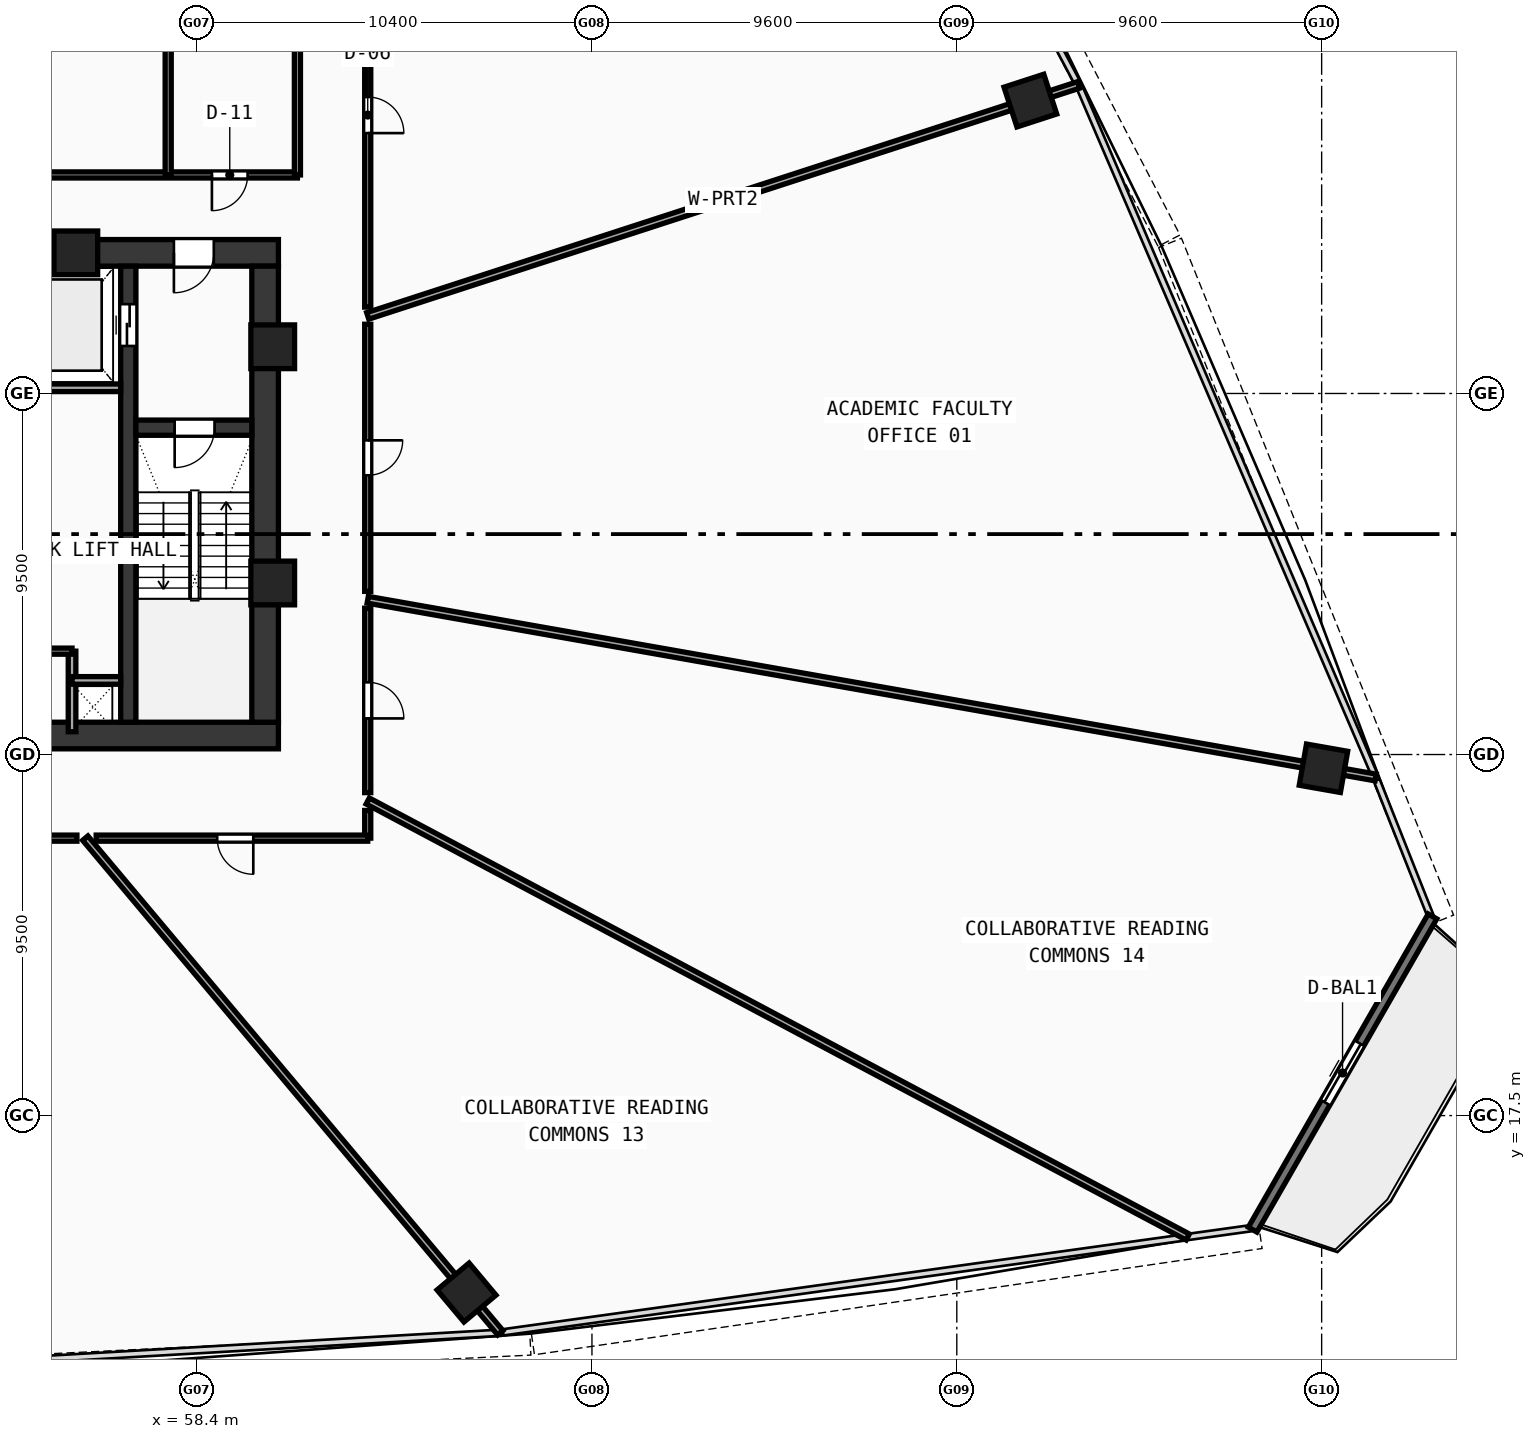
"""IFC4 building model, lengths in metres.
Left out: names, types, materials, properties, quantities, classifications, styles, units other than length and angle.
Written with IfcOpenShell. Run it as: python <this file> out.ifc"""

import sys

from ifc_helpers import new_model, si_unit, direction, frame, frame_2d, origin, origin_with_axes, origin_2d, place, context, subcontext, project, spatial, rectangle, hollow_rectangle, extrude, source, transform, mapped, element, fill, save


model = new_model("IFC4")
c1 = context("Model", 3, precision=1e-05, world=origin(), true_north=direction((0.0, 1.0)))
c2 = subcontext(c1, "Body", "Model", "MODEL_VIEW")
j1 = project(units=[si_unit("LENGTHUNIT", "METRE"), si_unit("PLANEANGLEUNIT", "RADIAN")], contexts=[c1])
p1 = place(None, origin())
s1 = spatial("IfcSite", under=j1, at=p1, CompositionType="ELEMENT")
p2 = place(p1, origin())
s2 = spatial("IfcBuilding", under=s1, at=p2, CompositionType="ELEMENT")
p3 = place(p2, frame((0.0, 0.0, 59.44)))
s3 = spatial("IfcBuildingStorey", under=s2, at=p3, CompositionType="ELEMENT", Elevation=59.44)
p4 = place(p3, frame((35.45, 27.5, 0.0), z_axis=(0.0, 0.0, 1.0), x_axis=(1.0, 0.0, 0.0)))
e1 = element("IfcWall", 1, at=p4, inside=s3, PredefinedType="SHEAR", context=c2, shape_type="SweptSolid", body=[
    extrude(rectangle(XDim=25.1, YDim=0.7, at=frame_2d((12.55, 0.0))), origin(), (0.0, 0.0, 1.0), 3.37),
])
p5 = place(p3, frame((49.2, 40.2, 0.0), z_axis=(0.0, 0.0, 1.0), x_axis=(1.0, 0.0, 0.0)))
e2 = element("IfcWall", 2, at=p5, inside=s3, PredefinedType="SHEAR", context=c2, shape_type="SweptSolid", body=[
    extrude(rectangle(XDim=11.35, YDim=0.7, at=frame_2d((5.675, 0.0))), origin(), (0.0, 0.0, 1.0), 3.37),
])
p6 = place(p5, frame((8.6, 0.0, 0.0)))
e3 = element("IfcOpeningElement", 3, at=p6, cuts=e2, PredefinedType="OPENING", context=c2, shape_type="SweptSolid", body=[
    extrude(rectangle(XDim=1.05, YDim=2.1, at=frame_2d((0.525, 1.05))), frame((0.0, 0.36, 0.0), z_axis=(0.0, -1.0, 0.0), x_axis=(1.0, 0.0, 0.0)), (0.0, 0.0, 1.0), 0.72),
])
p7 = place(p3, frame((60.2, 27.85, 0.0), z_axis=(0.0, 0.0, 1.0), x_axis=(0.0, 1.0, 0.0)))
e4 = element("IfcWall", 4, at=p7, inside=s3, PredefinedType="SHEAR", context=c2, shape_type="SweptSolid", body=[
    extrude(rectangle(XDim=12.0, YDim=0.7, at=frame_2d((6.0, 0.0))), origin(), (0.0, 0.0, 1.0), 3.37),
])
p8 = place(p3, frame((56.6, 27.85, 0.0), z_axis=(0.0, 0.0, 1.0), x_axis=(0.0, 1.0, 0.0)))
e5 = element("IfcWall", 5, at=p8, inside=s3, PredefinedType="SHEAR", context=c2, shape_type="SweptSolid", body=[
    extrude(rectangle(XDim=12.0, YDim=0.4, at=frame_2d((6.0, 0.0))), origin(), (0.0, 0.0, 1.0), 3.37),
])
p9 = place(p8, frame((9.9, 0.0, 0.0)))
e6 = element("IfcOpeningElement", 6, at=p9, cuts=e5, PredefinedType="OPENING", context=c2, shape_type="SweptSolid", body=[
    extrude(rectangle(XDim=1.1, YDim=2.1, at=frame_2d((0.55, 1.05))), frame((0.0, 0.21, 0.0), z_axis=(0.0, -1.0, 0.0), x_axis=(1.0, 0.0, 0.0)), (0.0, 0.0, 1.0), 0.42),
])
p10 = place(p3, frame((56.8, 35.6, 0.0), z_axis=(0.0, 0.0, 1.0), x_axis=(1.0, 0.0, 0.0)))
e7 = element("IfcWall", 7, at=p10, inside=s3, PredefinedType="SHEAR", context=c2, shape_type="SweptSolid", body=[
    extrude(rectangle(XDim=3.05, YDim=0.4, at=frame_2d((1.525, 0.0))), origin(), (0.0, 0.0, 1.0), 3.37),
])
p11 = place(p10, frame((1.02, 0.0, 0.0)))
e8 = element("IfcOpeningElement", 8, at=p11, cuts=e7, PredefinedType="OPENING", context=c2, shape_type="SweptSolid", body=[
    extrude(rectangle(XDim=1.05, YDim=2.1, at=frame_2d((0.525, 1.05))), frame((0.0, 0.21, 0.0), z_axis=(0.0, -1.0, 0.0), x_axis=(1.0, 0.0, 0.0)), (0.0, 0.0, 1.0), 0.42),
])
m1 = source(origin(), c2, "Body", "SweptSolid", [
    extrude(hollow_rectangle(XDim=1.15, YDim=1.15, WallThickness=0.048, at=origin_2d()), origin(), (0.0, 0.0, 1.0), 3.63),
])
for number, where, z_axis, x_axis in (
    (9, (60.4, 31.513, -0.26), (0.0, 0.0, 1.0), (1.0, 0.0, 0.0)),
    (10, (60.4, 37.729, -0.26), (0.0, 0.0, 1.0), (1.0, 0.0, 0.0)),
    (11, (55.219, 40.2, -0.26), (0.0, 0.0, 1.0), (1.0, 0.0, 0.0)),
):
    element("IfcColumn", number, at=place(p3, frame(where, z_axis=z_axis, x_axis=x_axis)), inside=s3, PredefinedType="COLUMN", context=c2, shape_type="MappedRepresentation", body=[
        mapped(m1, transform((0.0, 0.0, 0.0), scale=1.0)),
    ])
m2 = source(origin(), c2, "Body", "SweptSolid", [
    extrude(hollow_rectangle(XDim=1.1, YDim=1.1, WallThickness=0.045, at=origin_2d()), origin(), (0.0, 0.0, 1.0), 3.63),
])
for number, where, z_axis, x_axis in (
    (12, (65.5, 12.844, -0.26), (0.0, 0.0, 1.0), (0.766, 0.643, 0.0)),
    (13, (88.048, 26.638, -0.26), (0.0, 0.0, 1.0), (0.174, 0.985, 0.0)),
    (14, (80.335, 44.206, -0.26), (0.0, 0.0, 1.0), (-0.309, 0.951, 0.0)),
):
    element("IfcColumn", number, at=place(p3, frame(where, z_axis=z_axis, x_axis=x_axis)), inside=s3, PredefinedType="COLUMN", context=c2, shape_type="MappedRepresentation", body=[
        mapped(m2, transform((0.0, 0.0, 0.0), scale=1.0)),
    ])
p12 = place(p3, frame((86.184, 14.499, 0.0), z_axis=(0.0, 0.0, 1.0), x_axis=(0.497919395469, 0.86722331358, 0.0)))
e15 = element("IfcWall", 15, at=p12, inside=s3, PredefinedType="STANDARD", context=c2, shape_type="SweptSolid", body=[
    extrude(rectangle(XDim=9.504, YDim=0.26, at=frame_2d((4.752, 0.0))), origin(), (0.0, 0.0, 1.0), 3.37),
])
p13 = place(p12, frame((3.852, 0.0, 0.0)))
e16 = element("IfcOpeningElement", 16, at=p13, cuts=e15, PredefinedType="OPENING", context=c2, shape_type="SweptSolid", body=[
    extrude(rectangle(XDim=1.8, YDim=2.15, at=frame_2d((0.9, 1.075))), frame((0.0, 0.14, 0.0), z_axis=(0.0, -1.0, 0.0), x_axis=(1.0, 0.0, 0.0)), (0.0, 0.0, 1.0), 0.28),
])
p14 = place(p3, frame((53.68, 36.65, 0.0), z_axis=(0.0, 0.0, 1.0), x_axis=(1.0, 0.0, 0.0)))
e17 = element("IfcWall", 17, at=p14, inside=s3, PredefinedType="SOLIDWALL", context=c2, shape_type="SweptSolid", body=[
    extrude(rectangle(XDim=2.72, YDim=0.2, at=frame_2d((1.36, 0.0))), origin(), (0.0, 0.0, 1.0), 3.37),
])
p15 = place(p3, frame((55.12, 27.6, 0.0), z_axis=(0.0, 0.0, 1.0), x_axis=(0.0, 1.0, 0.0)))
e18 = element("IfcWall", 18, at=p15, inside=s3, PredefinedType="SOLIDWALL", context=c2, shape_type="SweptSolid", body=[
    extrude(rectangle(XDim=2.12, YDim=0.2, at=frame_2d((1.06, 0.0))), origin(), (0.0, 0.0, 1.0), 3.37),
])
p16 = place(p3, frame((55.12, 28.95, 0.0), z_axis=(0.0, 0.0, 1.0), x_axis=(1.0, 0.0, 0.0)))
e19 = element("IfcWall", 19, at=p16, inside=s3, PredefinedType="SOLIDWALL", context=c2, shape_type="SweptSolid", body=[
    extrude(rectangle(XDim=1.28, YDim=0.2, at=frame_2d((0.64, 0.0))), origin(), (0.0, 0.0, 1.0), 3.37),
])
p17 = place(p3, frame((51.05, 29.72, 0.0), z_axis=(0.0, 0.0, 1.0), x_axis=(1.0, 0.0, 0.0)))
e20 = element("IfcWall", 20, at=p17, inside=s3, PredefinedType="PARTITIONING", context=c2, shape_type="SweptSolid", body=[
    extrude(rectangle(XDim=4.07, YDim=0.16, at=frame_2d((2.035, 0.0))), origin(), (0.0, 0.0, 1.0), 3.37),
])
p18 = place(p17, frame((0.5, 0.0, 0.0)))
e21 = element("IfcOpeningElement", 21, at=p18, cuts=e20, PredefinedType="OPENING", context=c2, shape_type="SweptSolid", body=[
    extrude(rectangle(XDim=0.9, YDim=2.1, at=frame_2d((0.45, 1.05))), frame((0.0, 0.09, 0.0), z_axis=(0.0, -1.0, 0.0), x_axis=(1.0, 0.0, 0.0)), (0.0, 0.0, 1.0), 0.18),
])
p19 = place(p3, frame((45.92, 42.25, 0.0), z_axis=(0.0, 0.0, 1.0), x_axis=(1.0, 0.0, 0.0)))
e22 = element("IfcWall", 22, at=p19, inside=s3, PredefinedType="PARTITIONING", context=c2, shape_type="SweptSolid", body=[
    extrude(rectangle(XDim=15.13, YDim=0.16, at=frame_2d((7.565, 0.0))), origin(), (0.0, 0.0, 1.0), 2.67),
])
p20 = place(p19, frame((2.1, 0.0, 0.0)))
e23 = element("IfcOpeningElement", 23, at=p20, cuts=e22, PredefinedType="OPENING", context=c2, shape_type="SweptSolid", body=[
    extrude(rectangle(XDim=0.92, YDim=2.1, at=frame_2d((0.46, 1.05))), frame((0.0, 0.09, 0.0), z_axis=(0.0, -1.0, 0.0), x_axis=(1.0, 0.0, 0.0)), (0.0, 0.0, 1.0), 0.18),
])
p21 = place(p19, frame((12.88, 0.0, 0.0)))
e24 = element("IfcOpeningElement", 24, at=p21, cuts=e22, PredefinedType="OPENING", context=c2, shape_type="SweptSolid", body=[
    extrude(rectangle(XDim=0.94, YDim=2.1, at=frame_2d((0.47, 1.05))), frame((0.0, 0.09, 0.0), z_axis=(0.0, -1.0, 0.0), x_axis=(1.0, 0.0, 0.0)), (0.0, 0.0, 1.0), 0.18),
])
p22 = place(p3, frame((61.05, 42.25, 0.0), z_axis=(0.0, 0.0, 1.0), x_axis=(0.0, 1.0, 0.0)))
e25 = element("IfcWall", 25, at=p22, inside=s3, PredefinedType="PARTITIONING", context=c2, shape_type="SweptSolid", body=[
    extrude(rectangle(XDim=4.55, YDim=0.16, at=frame_2d((2.275, 0.0))), origin(), (0.0, 0.0, 1.0), 2.67),
])
p23 = place(p3, frame((57.65, 42.25, 0.0), z_axis=(0.0, 0.0, 1.0), x_axis=(0.0, 1.0, 0.0)))
e26 = element("IfcWall", 26, at=p23, inside=s3, PredefinedType="PARTITIONING", context=c2, shape_type="SweptSolid", body=[
    extrude(rectangle(XDim=4.35, YDim=0.16, at=frame_2d((2.175, 0.0))), origin(), (0.0, 0.0, 1.0), 2.67),
])
p24 = place(p3, frame((62.9, 38.541, 0.0), z_axis=(0.0, 0.0, 1.0), x_axis=(0.951053317048, 0.309026840471, 0.0)))
e27 = element("IfcWall", 27, at=p24, inside=s3, PredefinedType="PARTITIONING", context=c2, shape_type="SweptSolid", body=[
    extrude(rectangle(XDim=19.666, YDim=0.18, at=frame_2d((9.833, 0.0))), origin(), (0.0, 0.0, 1.0), 2.67),
])
p25 = place(p3, frame((55.468, 24.8, 0.0), z_axis=(0.0, 0.0, 1.0), x_axis=(0.642791593325, -0.766041100432, 0.0)))
e28 = element("IfcWall", 28, at=p25, inside=s3, PredefinedType="PARTITIONING", context=c2, shape_type="SweptSolid", body=[
    extrude(rectangle(XDim=16.988, YDim=0.18, at=frame_2d((8.494, 0.0))), origin(), (0.0, 0.0, 1.0), 2.67),
])
p26 = place(p3, frame((62.9, 25.778, 0.0), z_axis=(0.0, 0.0, 1.0), x_axis=(0.882949316257, -0.469468321531, 0.0)))
e29 = element("IfcWall", 29, at=p26, inside=s3, PredefinedType="PARTITIONING", context=c2, shape_type="SweptSolid", body=[
    extrude(rectangle(XDim=24.437, YDim=0.18, at=frame_2d((12.219, 0.0))), origin(), (0.0, 0.0, 1.0), 2.67),
])
p27 = place(p3, frame((62.9, 31.073, 0.0), z_axis=(0.0, 0.0, 1.0), x_axis=(0.984808099647, -0.173646211791, 0.0)))
e30 = element("IfcWall", 30, at=p27, inside=s3, PredefinedType="PARTITIONING", context=c2, shape_type="SweptSolid", body=[
    extrude(rectangle(XDim=26.93, YDim=0.18, at=frame_2d((13.465, 0.0))), origin(), (0.0, 0.0, 1.0), 2.67),
])
p28 = place(p3, frame((62.9, 48.65, 0.0), z_axis=(0.0, 0.0, 1.0), x_axis=(0.0, -1.0, 0.0)))
e31 = element("IfcWall", 31, at=p28, inside=s3, PredefinedType="PARTITIONING", context=c2, shape_type="SweptSolid", body=[
    extrude(rectangle(XDim=9.877, YDim=0.16, at=frame_2d((4.938, 0.0))), origin(), (0.0, 0.0, 1.0), 2.67),
])
p29 = place(p28, frame((4.349, 0.0, 0.0)))
e32 = element("IfcOpeningElement", 32, at=p29, cuts=e31, PredefinedType="OPENING", context=c2, shape_type="SweptSolid", body=[
    extrude(rectangle(XDim=0.95, YDim=2.1, at=frame_2d((0.475, 1.05))), frame((0.0, 0.09, 0.0), z_axis=(0.0, -1.0, 0.0), x_axis=(1.0, 0.0, 0.0)), (0.0, 0.0, 1.0), 0.18),
])
p30 = place(p3, frame((62.9, 38.322, 0.0), z_axis=(0.0, 0.0, 1.0), x_axis=(0.0, -1.0, 0.0)))
e33 = element("IfcWall", 33, at=p30, inside=s3, PredefinedType="PARTITIONING", context=c2, shape_type="SweptSolid", body=[
    extrude(rectangle(XDim=7.029, YDim=0.16, at=frame_2d((3.515, 0.0))), origin(), (0.0, 0.0, 1.0), 3.37),
])
p31 = place(p30, frame((3.054, 0.0, 0.0)))
e34 = element("IfcOpeningElement", 34, at=p31, cuts=e33, PredefinedType="OPENING", context=c2, shape_type="SweptSolid", body=[
    extrude(rectangle(XDim=0.92, YDim=2.1, at=frame_2d((0.46, 1.05))), frame((0.0, 0.09, 0.0), z_axis=(0.0, -1.0, 0.0), x_axis=(1.0, 0.0, 0.0)), (0.0, 0.0, 1.0), 0.18),
])
p32 = place(p3, frame((62.9, 30.849, 0.0), z_axis=(0.0, 0.0, 1.0), x_axis=(0.0, -1.0, 0.0)))
e35 = element("IfcWall", 35, at=p32, inside=s3, PredefinedType="PARTITIONING", context=c2, shape_type="SweptSolid", body=[
    extrude(rectangle(XDim=4.852, YDim=0.16, at=frame_2d((2.426, 0.0))), origin(), (0.0, 0.0, 1.0), 3.37),
])
p33 = place(p32, frame((1.949, 0.0, 0.0)))
e36 = element("IfcOpeningElement", 36, at=p33, cuts=e35, PredefinedType="OPENING", context=c2, shape_type="SweptSolid", body=[
    extrude(rectangle(XDim=0.95, YDim=2.1, at=frame_2d((0.475, 1.05))), frame((0.0, 0.09, 0.0), z_axis=(0.0, -1.0, 0.0), x_axis=(1.0, 0.0, 0.0)), (0.0, 0.0, 1.0), 0.18),
])
p34 = place(p3, frame((62.9, 25.528, 0.0), z_axis=(0.0, 0.0, 1.0), x_axis=(0.0, -1.0, 0.0)))
e37 = element("IfcWall", 37, at=p34, inside=s3, PredefinedType="PARTITIONING", context=c2, shape_type="SweptSolid", body=[
    extrude(rectangle(XDim=0.728, YDim=0.16, at=frame_2d((0.364, 0.0))), origin(), (0.0, 0.0, 1.0), 2.97),
])
p35 = place(p3, frame((62.9, 24.8, 0.0), z_axis=(0.0, 0.0, 1.0), x_axis=(-1.0, 0.0, 0.0)))
e38 = element("IfcWall", 38, at=p35, inside=s3, PredefinedType="PARTITIONING", context=c2, shape_type="SweptSolid", body=[
    extrude(rectangle(XDim=7.145, YDim=0.16, at=frame_2d((3.572, 0.0))), origin(), (0.0, 0.0, 1.0), 2.97),
])
p36 = place(p35, frame((3.011, 0.0, 0.0)))
e39 = element("IfcOpeningElement", 39, at=p36, cuts=e38, PredefinedType="OPENING", context=c2, shape_type="SweptSolid", body=[
    extrude(rectangle(XDim=0.95, YDim=2.1, at=frame_2d((0.475, 1.05))), frame((0.0, 0.09, 0.0), z_axis=(0.0, -1.0, 0.0), x_axis=(1.0, 0.0, 0.0)), (0.0, 0.0, 1.0), 0.18),
])
p37 = place(p3, frame((55.248, 24.8, 0.0), z_axis=(0.0, 0.0, 1.0), x_axis=(-1.0, 0.0, 0.0)))
e40 = element("IfcWall", 40, at=p37, inside=s3, PredefinedType="PARTITIONING", context=c2, shape_type="SweptSolid", body=[
    extrude(rectangle(XDim=9.413, YDim=0.16, at=frame_2d((4.707, 0.0))), origin(), (0.0, 0.0, 1.0), 2.67),
])
p38 = place(p37, frame((4.231, 0.0, 0.0)))
e41 = element("IfcOpeningElement", 41, at=p38, cuts=e40, PredefinedType="OPENING", context=c2, shape_type="SweptSolid", body=[
    extrude(rectangle(XDim=0.95, YDim=2.1, at=frame_2d((0.475, 1.05))), frame((0.0, 0.09, 0.0), z_axis=(0.0, -1.0, 0.0), x_axis=(1.0, 0.0, 0.0)), (0.0, 0.0, 1.0), 0.18),
])
m3 = source(origin(), c2, "Body", "SweptSolid", [
    extrude(rectangle(XDim=1.8, YDim=2.15, at=frame_2d((0.9, 1.075))), frame((0.0, 0.025, 0.0), z_axis=(0.0, -1.0, 0.0), x_axis=(1.0, 0.0, 0.0)), (0.0, 0.0, 1.0), 0.05),
])
p39 = place(p13, origin_with_axes())
e42 = element("IfcDoor", 42, at=p39, inside=s3, OperationType="DOUBLE_DOOR_SLIDING", PredefinedType="DOOR", context=c2, shape_type="MappedRepresentation", body=[
    mapped(m3, transform((0.0, 0.0, 0.0), scale=1.0)),
])
fill(e16, e42)
m4 = source(origin(), c2, "Body", "SweptSolid", [
    extrude(rectangle(XDim=1.05, YDim=2.1, at=frame_2d((0.525, 1.05))), frame((0.0, 0.025, 0.0), z_axis=(0.0, -1.0, 0.0), x_axis=(1.0, 0.0, 0.0)), (0.0, 0.0, 1.0), 0.05),
])
p40 = place(p11, frame((1.05, 0.0, 0.0), z_axis=(0.0, 0.0, 1.0), x_axis=(-1.0, 0.0, 0.0)))
e43 = element("IfcDoor", 43, at=p40, inside=s3, OperationType="SINGLE_SWING_RIGHT", PredefinedType="DOOR", context=c2, shape_type="MappedRepresentation", body=[
    mapped(m4, transform((0.0, 0.0, 0.0), scale=1.0)),
])
fill(e8, e43)
p41 = place(p6, frame((1.05, 0.0, 0.0), z_axis=(0.0, 0.0, 1.0), x_axis=(-1.0, 0.0, 0.0)))
e44 = element("IfcDoor", 44, at=p41, inside=s3, OperationType="SINGLE_SWING_RIGHT", PredefinedType="DOOR", context=c2, shape_type="MappedRepresentation", body=[
    mapped(m4, transform((0.0, 0.0, 0.0), scale=1.0)),
])
fill(e3, e44)
m5 = source(origin(), c2, "Body", "SweptSolid", [
    extrude(rectangle(XDim=1.1, YDim=2.1, at=frame_2d((0.55, 1.05))), frame((0.0, 0.025, 0.0), z_axis=(0.0, -1.0, 0.0), x_axis=(1.0, 0.0, 0.0)), (0.0, 0.0, 1.0), 0.05),
])
p42 = place(p9, origin_with_axes())
e45 = element("IfcDoor", 45, at=p42, inside=s3, OperationType="DOUBLE_DOOR_SLIDING", PredefinedType="DOOR", context=c2, shape_type="MappedRepresentation", body=[
    mapped(m5, transform((0.0, 0.0, 0.0), scale=1.0)),
])
fill(e6, e45)
m6 = source(origin(), c2, "Body", "SweptSolid", [
    extrude(rectangle(XDim=0.94, YDim=2.1, at=frame_2d((0.47, 1.05))), frame((0.0, 0.025, 0.0), z_axis=(0.0, -1.0, 0.0), x_axis=(1.0, 0.0, 0.0)), (0.0, 0.0, 1.0), 0.05),
])
p43 = place(p21, frame((0.94, 0.0, 0.0), z_axis=(0.0, 0.0, 1.0), x_axis=(-1.0, 0.0, 0.0)))
e46 = element("IfcDoor", 46, at=p43, inside=s3, OperationType="SINGLE_SWING_RIGHT", PredefinedType="DOOR", context=c2, shape_type="MappedRepresentation", body=[
    mapped(m6, transform((0.0, 0.0, 0.0), scale=1.0)),
])
fill(e24, e46)
m7 = source(origin(), c2, "Body", "SweptSolid", [
    extrude(rectangle(XDim=0.92, YDim=2.1, at=frame_2d((0.46, 1.05))), frame((0.0, 0.025, 0.0), z_axis=(0.0, -1.0, 0.0), x_axis=(1.0, 0.0, 0.0)), (0.0, 0.0, 1.0), 0.05),
])
p44 = place(p31, origin_with_axes())
e47 = element("IfcDoor", 47, at=p44, inside=s3, OperationType="SINGLE_SWING_LEFT", PredefinedType="DOOR", context=c2, shape_type="MappedRepresentation", body=[
    mapped(m7, transform((0.0, 0.0, 0.0), scale=1.0)),
])
fill(e34, e47)
m8 = source(origin(), c2, "Body", "SweptSolid", [
    extrude(rectangle(XDim=0.95, YDim=2.1, at=frame_2d((0.475, 1.05))), frame((0.0, 0.025, 0.0), z_axis=(0.0, -1.0, 0.0), x_axis=(1.0, 0.0, 0.0)), (0.0, 0.0, 1.0), 0.05),
])
p45 = place(p29, origin_with_axes())
e48 = element("IfcDoor", 48, at=p45, inside=s3, OperationType="SINGLE_SWING_RIGHT", PredefinedType="DOOR", context=c2, shape_type="MappedRepresentation", body=[
    mapped(m8, transform((0.0, 0.0, 0.0), scale=1.0)),
])
fill(e32, e48)
p46 = place(p36, origin_with_axes())
e49 = element("IfcDoor", 49, at=p46, inside=s3, OperationType="SINGLE_SWING_LEFT", PredefinedType="DOOR", context=c2, shape_type="MappedRepresentation", body=[
    mapped(m8, transform((0.0, 0.0, 0.0), scale=1.0)),
])
fill(e39, e49)
p47 = place(p33, origin_with_axes())
e50 = element("IfcDoor", 50, at=p47, inside=s3, OperationType="SINGLE_SWING_RIGHT", PredefinedType="DOOR", context=c2, shape_type="MappedRepresentation", body=[
    mapped(m8, transform((0.0, 0.0, 0.0), scale=1.0)),
])
fill(e36, e50)
save(model, sys.argv[1])
